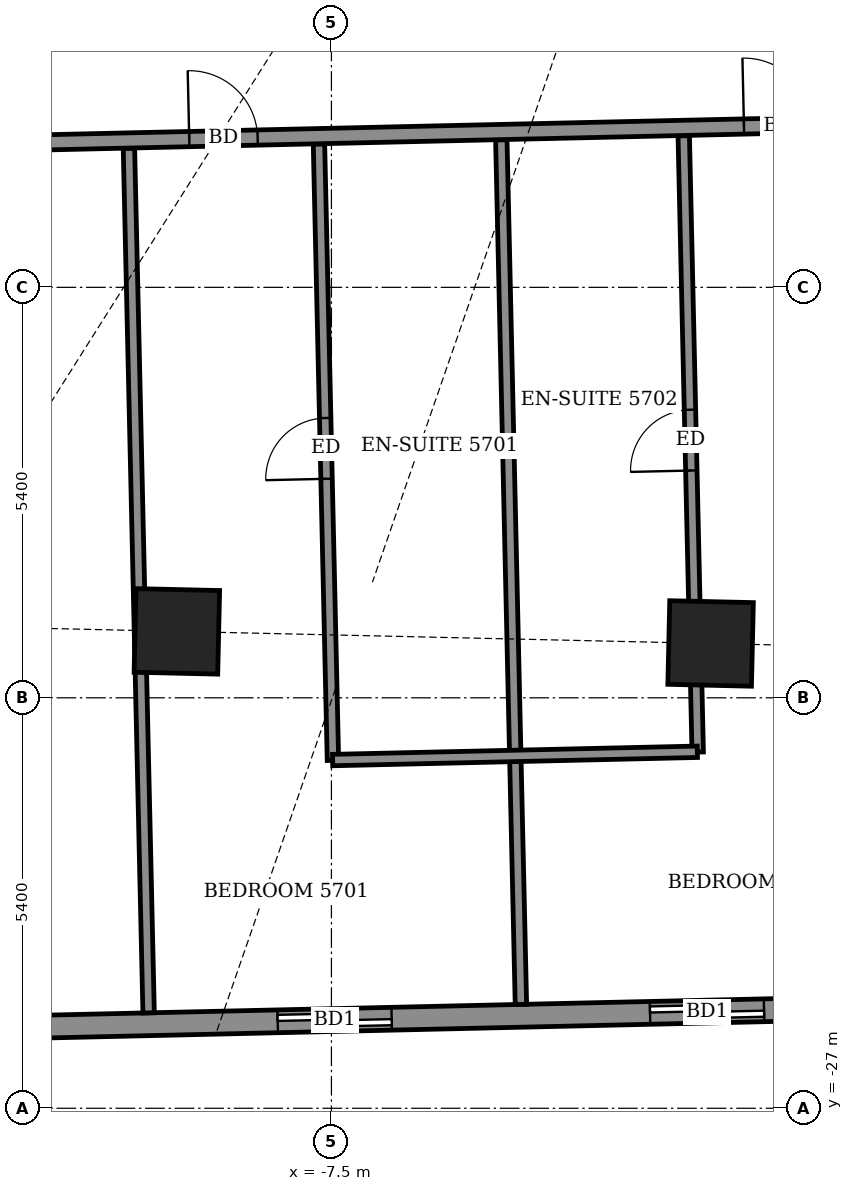
"""IFC4 building model, lengths in metres.
Left out: names, types, materials, properties, quantities, classifications, styles, units other than length and angle.
Written with IfcOpenShell. Run it as: python <this file> out.ifc"""

import sys

from ifc_helpers import new_model, si_unit, direction, frame, frame_2d, origin, origin_2d, place, context, subcontext, project, spatial, rectangle, extrude, element, fill, save


model = new_model("IFC4")
c1 = context("Model", 3, precision=1e-05, world=origin(), true_north=direction((0.0, 1.0)))
c2 = subcontext(c1, "Body", "Model", "MODEL_VIEW")
j1 = project(units=[si_unit("LENGTHUNIT", "METRE"), si_unit("PLANEANGLEUNIT", "RADIAN")], contexts=[c1])
p1 = place(None, origin())
s1 = spatial("IfcSite", under=j1, at=p1, CompositionType="ELEMENT")
p2 = place(p1, origin())
s2 = spatial("IfcBuilding", under=s1, at=p2, CompositionType="ELEMENT")
p3 = place(p2, frame((0.0, 0.0, 226.5)))
s3 = spatial("IfcBuildingStorey", under=s2, at=p3, CompositionType="ELEMENT", Elevation=226.5)
for number, where, z_axis, x_axis in (
    (1, (-9.533, -20.726, -0.55), (0.0, 0.0, 1.0), (1.0, -0.023, 0.0)),
    (2, (-2.511, -20.885, -0.55), (0.0, 0.0, 1.0), (1.0, -0.023, 0.0)),
):
    element("IfcColumn", number, at=place(p3, frame(where, z_axis=z_axis, x_axis=x_axis)), inside=s3, PredefinedType="COLUMN", context=c2, shape_type="SweptSolid", body=[
        extrude(rectangle(XDim=1.1, YDim=1.1, at=origin_2d()), origin(), (0.0, 0.0, 1.0), 4.6),
    ])
p4 = place(p3, frame((-23.403, -26.201, 0.0), z_axis=(0.0, 0.0, 1.0), x_axis=(0.999742770494, 0.022680230258, 0.0)))
e3 = element("IfcWall", 3, at=p4, inside=s3, PredefinedType="SOLIDWALL", context=c2, shape_type="SweptSolid", body=[
    extrude(rectangle(XDim=43.908, YDim=0.3, at=frame_2d((21.954, 0.0))), origin(), (0.0, 0.0, 1.0), 2.85),
])
p5 = place(p4, frame((2.0, 0.0, 0.0)))
e4 = element("IfcOpeningElement", 4, at=p5, cuts=e3, PredefinedType="OPENING", context=c2, shape_type="SweptSolid", body=[
    extrude(rectangle(XDim=1.5, YDim=2.4, at=frame_2d((0.75, 1.2))), frame((0.0, 0.16, 0.0), z_axis=(0.0, -1.0, 0.0), x_axis=(1.0, 0.0, 0.0)), (0.0, 0.0, 1.0), 0.32),
])
p6 = place(p4, frame((8.375, 0.0, 0.9)))
e5 = element("IfcOpeningElement", 5, at=p6, cuts=e3, PredefinedType="OPENING", context=c2, shape_type="SweptSolid", body=[
    extrude(rectangle(XDim=2.4, YDim=1.5, at=frame_2d((1.2, 0.75))), frame((0.0, 0.16, 0.0), z_axis=(0.0, -1.0, 0.0), x_axis=(1.0, 0.0, 0.0)), (0.0, 0.0, 1.0), 0.32),
])
p7 = place(p4, frame((15.2, 0.0, 0.0)))
e6 = element("IfcOpeningElement", 6, at=p7, cuts=e3, PredefinedType="OPENING", context=c2, shape_type="SweptSolid", body=[
    extrude(rectangle(XDim=1.5, YDim=2.4, at=frame_2d((0.75, 1.2))), frame((0.0, 0.16, 0.0), z_axis=(0.0, -1.0, 0.0), x_axis=(1.0, 0.0, 0.0)), (0.0, 0.0, 1.0), 0.32),
])
p8 = place(p4, frame((20.1, 0.0, 0.0)))
e7 = element("IfcOpeningElement", 7, at=p8, cuts=e3, PredefinedType="OPENING", context=c2, shape_type="SweptSolid", body=[
    extrude(rectangle(XDim=1.5, YDim=2.4, at=frame_2d((0.75, 1.2))), frame((0.0, 0.16, 0.0), z_axis=(0.0, -1.0, 0.0), x_axis=(1.0, 0.0, 0.0)), (0.0, 0.0, 1.0), 0.32),
])
p9 = place(p4, frame((24.975, 0.0, 0.0)))
e8 = element("IfcOpeningElement", 8, at=p9, cuts=e3, PredefinedType="OPENING", context=c2, shape_type="SweptSolid", body=[
    extrude(rectangle(XDim=1.5, YDim=2.4, at=frame_2d((0.75, 1.2))), frame((0.0, 0.16, 0.0), z_axis=(0.0, -1.0, 0.0), x_axis=(1.0, 0.0, 0.0)), (0.0, 0.0, 1.0), 0.32),
])
p10 = place(p4, frame((30.5, 0.0, 0.9)))
e9 = element("IfcOpeningElement", 9, at=p10, cuts=e3, PredefinedType="OPENING", context=c2, shape_type="SweptSolid", body=[
    extrude(rectangle(XDim=2.4, YDim=1.5, at=frame_2d((1.2, 0.75))), frame((0.0, 0.16, 0.0), z_axis=(0.0, -1.0, 0.0), x_axis=(1.0, 0.0, 0.0)), (0.0, 0.0, 1.0), 0.32),
])
p11 = place(p4, frame((36.875, 0.0, 0.9)))
e10 = element("IfcOpeningElement", 10, at=p11, cuts=e3, PredefinedType="OPENING", context=c2, shape_type="SweptSolid", body=[
    extrude(rectangle(XDim=2.4, YDim=1.5, at=frame_2d((1.2, 0.75))), frame((0.0, 0.16, 0.0), z_axis=(0.0, -1.0, 0.0), x_axis=(1.0, 0.0, 0.0)), (0.0, 0.0, 1.0), 0.32),
])
p12 = place(p4, frame((41.879, 0.0, 0.9)))
e11 = element("IfcOpeningElement", 11, at=p12, cuts=e3, PredefinedType="OPENING", context=c2, shape_type="SweptSolid", body=[
    extrude(rectangle(XDim=1.2, YDim=1.5, at=frame_2d((0.6, 0.75))), frame((0.0, 0.16, 0.0), z_axis=(0.0, -1.0, 0.0), x_axis=(1.0, 0.0, 0.0)), (0.0, 0.0, 1.0), 0.32),
])
p13 = place(p3, frame((-9.905, -25.745, 0.0), z_axis=(0.0, 0.0, 1.0), x_axis=(-0.022770155219, 0.999740726404, 0.0)))
e12 = element("IfcWall", 12, at=p13, inside=s3, PredefinedType="PARTITIONING", context=c2, shape_type="SweptSolid", body=[
    extrude(rectangle(XDim=11.376, YDim=0.15, at=frame_2d((5.688, 0.0))), origin(), (0.0, 0.0, 1.0), 2.55),
])
p14 = place(p3, frame((-5.007, -25.634, 0.0), z_axis=(0.0, 0.0, 1.0), x_axis=(-0.022660960485, 0.999743207464, 0.0)))
e13 = element("IfcWall", 13, at=p14, inside=s3, PredefinedType="PARTITIONING", context=c2, shape_type="SweptSolid", body=[
    extrude(rectangle(XDim=11.377, YDim=0.15, at=frame_2d((5.688, 0.0))), origin(), (0.0, 0.0, 1.0), 2.55),
])
p15 = place(p3, frame((-7.48, -22.423, 0.0), z_axis=(0.0, 0.0, 1.0), x_axis=(-0.022697472341, 0.99974237919, 0.0)))
e14 = element("IfcWall", 14, at=p15, inside=s3, PredefinedType="PARTITIONING", context=c2, shape_type="SweptSolid", body=[
    extrude(rectangle(XDim=8.11, YDim=0.15, at=frame_2d((4.055, 0.0))), origin(), (0.0, 0.0, 1.0), 2.55),
])
p16 = place(p15, frame((3.705, 0.0, 0.0)))
e15 = element("IfcOpeningElement", 15, at=p16, cuts=e14, PredefinedType="OPENING", context=c2, shape_type="SweptSolid", body=[
    extrude(rectangle(XDim=0.8, YDim=2.1, at=frame_2d((0.4, 1.05))), frame((0.0, 0.085, 0.0), z_axis=(0.0, -1.0, 0.0), x_axis=(1.0, 0.0, 0.0)), (0.0, 0.0, 1.0), 0.17),
])
p17 = place(p3, frame((-2.681, -22.314, 0.0), z_axis=(0.0, 0.0, 1.0), x_axis=(-0.022698155442, 0.999742363682, 0.0)))
e16 = element("IfcWall", 16, at=p17, inside=s3, PredefinedType="PARTITIONING", context=c2, shape_type="SweptSolid", body=[
    extrude(rectangle(XDim=8.11, YDim=0.15, at=frame_2d((4.055, 0.0))), origin(), (0.0, 0.0, 1.0), 4.05),
])
p18 = place(p17, frame((3.705, 0.0, 0.0)))
e17 = element("IfcOpeningElement", 17, at=p18, cuts=e16, PredefinedType="OPENING", context=c2, shape_type="SweptSolid", body=[
    extrude(rectangle(XDim=0.8, YDim=2.1, at=frame_2d((0.4, 1.05))), frame((0.0, 0.085, 0.0), z_axis=(0.0, -1.0, 0.0), x_axis=(1.0, 0.0, 0.0)), (0.0, 0.0, 1.0), 0.17),
])
p19 = place(p3, frame((-7.484, -22.419, 0.0), z_axis=(0.0, 0.0, 1.0), x_axis=(0.999742570398, 0.022689048768, 0.0)))
e18 = element("IfcWall", 18, at=p19, inside=s3, PredefinedType="PARTITIONING", context=c2, shape_type="SweptSolid", body=[
    extrude(rectangle(XDim=4.799, YDim=0.15, at=frame_2d((2.399, 0.0))), origin(), (0.0, 0.0, 1.0), 2.85),
])
p20 = place(p3, frame((-27.016, -14.65, 0.0), z_axis=(0.0, 0.0, 1.0), x_axis=(0.999742722722, 0.022682335961, 0.0)))
e19 = element("IfcWall", 19, at=p20, inside=s3, PredefinedType="PARTITIONING", context=c2, shape_type="SweptSolid", body=[
    extrude(rectangle(XDim=49.114, YDim=0.2, at=frame_2d((24.557, 0.0))), origin(), (0.0, 0.0, 1.0), 2.55),
])
p21 = place(p20, frame((2.0, 0.0, 0.0)))
e20 = element("IfcOpeningElement", 20, at=p21, cuts=e19, PredefinedType="OPENING", context=c2, shape_type="SweptSolid", body=[
    extrude(rectangle(XDim=1.0, YDim=2.1, at=frame_2d((0.5, 1.05))), frame((0.0, 0.11, 0.0), z_axis=(0.0, -1.0, 0.0), x_axis=(1.0, 0.0, 0.0)), (0.0, 0.0, 1.0), 0.22),
])
p22 = place(p20, frame((7.35, 0.0, 0.0)))
e21 = element("IfcOpeningElement", 21, at=p22, cuts=e19, PredefinedType="OPENING", context=c2, shape_type="SweptSolid", body=[
    extrude(rectangle(XDim=0.9, YDim=2.1, at=frame_2d((0.45, 1.05))), frame((0.0, 0.11, 0.0), z_axis=(0.0, -1.0, 0.0), x_axis=(1.0, 0.0, 0.0)), (0.0, 0.0, 1.0), 0.22),
])
p23 = place(p20, frame((13.725, 0.0, 0.0)))
e22 = element("IfcOpeningElement", 22, at=p23, cuts=e19, PredefinedType="OPENING", context=c2, shape_type="SweptSolid", body=[
    extrude(rectangle(XDim=1.0, YDim=2.1, at=frame_2d((0.5, 1.05))), frame((0.0, 0.11, 0.0), z_axis=(0.0, -1.0, 0.0), x_axis=(1.0, 0.0, 0.0)), (0.0, 0.0, 1.0), 0.22),
])
p24 = place(p20, frame((9.85, 0.0, 0.0)))
e23 = element("IfcOpeningElement", 23, at=p24, cuts=e19, PredefinedType="OPENING", context=c2, shape_type="SweptSolid", body=[
    extrude(rectangle(XDim=0.9, YDim=2.1, at=frame_2d((0.45, 1.05))), frame((0.0, 0.11, 0.0), z_axis=(0.0, -1.0, 0.0), x_axis=(1.0, 0.0, 0.0)), (0.0, 0.0, 1.0), 0.22),
])
p25 = place(p20, frame((17.65, 0.0, 0.0)))
e24 = element("IfcOpeningElement", 24, at=p25, cuts=e19, PredefinedType="OPENING", context=c2, shape_type="SweptSolid", body=[
    extrude(rectangle(XDim=0.9, YDim=2.1, at=frame_2d((0.45, 1.05))), frame((0.0, 0.11, 0.0), z_axis=(0.0, -1.0, 0.0), x_axis=(1.0, 0.0, 0.0)), (0.0, 0.0, 1.0), 0.22),
])
p26 = place(p20, frame((24.95, 0.0, 0.0)))
e25 = element("IfcOpeningElement", 25, at=p26, cuts=e19, PredefinedType="OPENING", context=c2, shape_type="SweptSolid", body=[
    extrude(rectangle(XDim=0.9, YDim=2.1, at=frame_2d((0.45, 1.05))), frame((0.0, 0.11, 0.0), z_axis=(0.0, -1.0, 0.0), x_axis=(1.0, 0.0, 0.0)), (0.0, 0.0, 1.0), 0.22),
])
p27 = place(p20, frame((27.425, 0.0, 0.0)))
e26 = element("IfcOpeningElement", 26, at=p27, cuts=e19, PredefinedType="OPENING", context=c2, shape_type="SweptSolid", body=[
    extrude(rectangle(XDim=0.9, YDim=2.1, at=frame_2d((0.45, 1.05))), frame((0.0, 0.11, 0.0), z_axis=(0.0, -1.0, 0.0), x_axis=(1.0, 0.0, 0.0)), (0.0, 0.0, 1.0), 0.22),
])
p28 = place(p20, frame((35.75, 0.0, 0.0)))
e27 = element("IfcOpeningElement", 27, at=p28, cuts=e19, PredefinedType="OPENING", context=c2, shape_type="SweptSolid", body=[
    extrude(rectangle(XDim=1.0, YDim=2.1, at=frame_2d((0.5, 1.05))), frame((0.0, 0.11, 0.0), z_axis=(0.0, -1.0, 0.0), x_axis=(1.0, 0.0, 0.0)), (0.0, 0.0, 1.0), 0.22),
])
p29 = place(p20, frame((32.25, 0.0, 0.0)))
e28 = element("IfcOpeningElement", 28, at=p29, cuts=e19, PredefinedType="OPENING", context=c2, shape_type="SweptSolid", body=[
    extrude(rectangle(XDim=0.9, YDim=2.1, at=frame_2d((0.45, 1.05))), frame((0.0, 0.11, 0.0), z_axis=(0.0, -1.0, 0.0), x_axis=(1.0, 0.0, 0.0)), (0.0, 0.0, 1.0), 0.22),
])
p30 = place(p20, frame((40.925, 0.0, 0.0)))
e29 = element("IfcOpeningElement", 29, at=p30, cuts=e19, PredefinedType="OPENING", context=c2, shape_type="SweptSolid", body=[
    extrude(rectangle(XDim=1.0, YDim=2.1, at=frame_2d((0.5, 1.05))), frame((0.0, 0.11, 0.0), z_axis=(0.0, -1.0, 0.0), x_axis=(1.0, 0.0, 0.0)), (0.0, 0.0, 1.0), 0.22),
])
p31 = place(p20, frame((47.607, 0.0, 0.0)))
e30 = element("IfcOpeningElement", 30, at=p31, cuts=e19, PredefinedType="OPENING", context=c2, shape_type="SweptSolid", body=[
    extrude(rectangle(XDim=1.0, YDim=2.1, at=frame_2d((0.5, 1.05))), frame((0.0, 0.11, 0.0), z_axis=(0.0, -1.0, 0.0), x_axis=(1.0, 0.0, 0.0)), (0.0, 0.0, 1.0), 0.22),
])
p32 = place(p7, origin())
e31 = element("IfcDoor", 31, at=p32, inside=s3, OperationType="SLIDING_TO_LEFT", PredefinedType="DOOR", context=c2, shape_type="SweptSolid", body=[
    extrude(rectangle(XDim=1.5, YDim=2.4, at=frame_2d((0.75, 1.2))), frame((0.0, 0.025, 0.0), z_axis=(0.0, -1.0, 0.0), x_axis=(1.0, 0.0, 0.0)), (0.0, 0.0, 1.0), 0.05),
])
fill(e6, e31)
p33 = place(p8, origin())
e32 = element("IfcDoor", 32, at=p33, inside=s3, OperationType="SLIDING_TO_LEFT", PredefinedType="DOOR", context=c2, shape_type="SweptSolid", body=[
    extrude(rectangle(XDim=1.5, YDim=2.4, at=frame_2d((0.75, 1.2))), frame((0.0, 0.025, 0.0), z_axis=(0.0, -1.0, 0.0), x_axis=(1.0, 0.0, 0.0)), (0.0, 0.0, 1.0), 0.05),
])
fill(e7, e32)
p34 = place(p25, origin())
e33 = element("IfcDoor", 33, at=p34, inside=s3, OperationType="SINGLE_SWING_LEFT", PredefinedType="DOOR", context=c2, shape_type="SweptSolid", body=[
    extrude(rectangle(XDim=0.9, YDim=2.1, at=frame_2d((0.45, 1.05))), frame((0.0, 0.025, 0.0), z_axis=(0.0, -1.0, 0.0), x_axis=(1.0, 0.0, 0.0)), (0.0, 0.0, 1.0), 0.05),
])
fill(e24, e33)
p35 = place(p16, origin())
e34 = element("IfcDoor", 34, at=p35, inside=s3, OperationType="SINGLE_SWING_LEFT", PredefinedType="DOOR", context=c2, shape_type="SweptSolid", body=[
    extrude(rectangle(XDim=0.8, YDim=2.1, at=frame_2d((0.4, 1.05))), frame((0.0, 0.025, 0.0), z_axis=(0.0, -1.0, 0.0), x_axis=(1.0, 0.0, 0.0)), (0.0, 0.0, 1.0), 0.05),
])
fill(e15, e34)
p36 = place(p26, origin())
e35 = element("IfcDoor", 35, at=p36, inside=s3, OperationType="SINGLE_SWING_RIGHT", PredefinedType="DOOR", context=c2, shape_type="SweptSolid", body=[
    extrude(rectangle(XDim=0.9, YDim=2.1, at=frame_2d((0.45, 1.05))), frame((0.0, 0.025, 0.0), z_axis=(0.0, -1.0, 0.0), x_axis=(1.0, 0.0, 0.0)), (0.0, 0.0, 1.0), 0.05),
])
fill(e25, e35)
p37 = place(p18, origin())
e36 = element("IfcDoor", 36, at=p37, inside=s3, OperationType="SINGLE_SWING_RIGHT", PredefinedType="DOOR", context=c2, shape_type="SweptSolid", body=[
    extrude(rectangle(XDim=0.8, YDim=2.1, at=frame_2d((0.4, 1.05))), frame((0.0, 0.025, 0.0), z_axis=(0.0, -1.0, 0.0), x_axis=(1.0, 0.0, 0.0)), (0.0, 0.0, 1.0), 0.05),
])
fill(e17, e36)
save(model, sys.argv[1])
